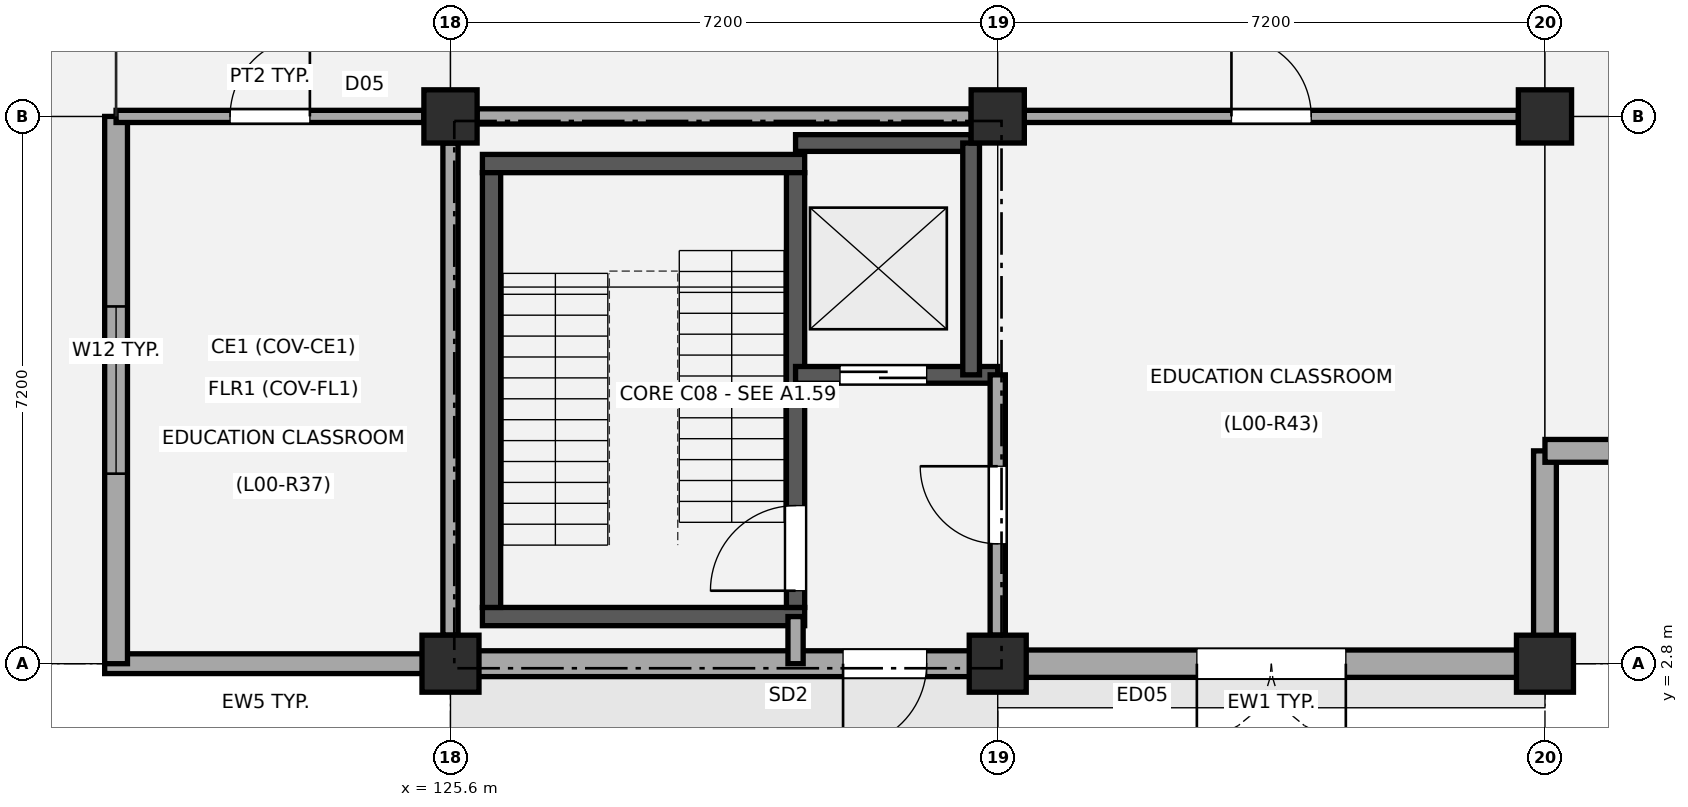
"""IFC4 building model, lengths in metres.
Left out: names, types, materials, properties, quantities, classifications, styles, units other than length and angle.
Written with IfcOpenShell. Run it as: python <this file> out.ifc"""

import sys

from ifc_helpers import new_model, si_unit, direction, frame, frame_2d, origin, origin_2d, place, context, subcontext, project, spatial, rectangle, circle, extrude, element, fill, save


model = new_model("IFC4")
c1 = context("Model", 3, precision=1e-05, world=origin(), true_north=direction((0.0, 1.0)))
c2 = subcontext(c1, "Body", "Model", "MODEL_VIEW")
j1 = project(units=[si_unit("LENGTHUNIT", "METRE"), si_unit("PLANEANGLEUNIT", "RADIAN")], contexts=[c1])
p1 = place(None, origin())
s1 = spatial("IfcSite", under=j1, at=p1, CompositionType="ELEMENT")
p2 = place(p1, origin())
s2 = spatial("IfcBuilding", under=s1, at=p2, CompositionType="ELEMENT")
p3 = place(p2, origin())
s3 = spatial("IfcBuildingStorey", under=s2, at=p3, CompositionType="ELEMENT", Elevation=0.0)
p4 = place(p3, frame((125.6, 2.8, -0.35), z_axis=(0.0, 0.0, 1.0), x_axis=(1.0, 0.0, 0.0)))
e1 = element("IfcColumn", 1, at=p4, inside=s3, PredefinedType="COLUMN", context=c2, shape_type="SweptSolid", body=[
    extrude(circle(Radius=0.375, at=origin_2d()), origin(), (0.0, 0.0, 1.0), 5.03),
])
p5 = place(p3, frame((125.6, 10.0, -0.35), z_axis=(0.0, 0.0, 1.0), x_axis=(1.0, 0.0, 0.0)))
e2 = element("IfcColumn", 2, at=p5, inside=s3, PredefinedType="COLUMN", context=c2, shape_type="SweptSolid", body=[
    extrude(rectangle(XDim=0.7, YDim=0.7, at=origin_2d()), origin(), (0.0, 0.0, 1.0), 5.03),
])
p6 = place(p3, frame((132.8, 2.8, -0.35), z_axis=(0.0, 0.0, 1.0), x_axis=(1.0, 0.0, 0.0)))
e3 = element("IfcColumn", 3, at=p6, inside=s3, PredefinedType="COLUMN", context=c2, shape_type="SweptSolid", body=[
    extrude(circle(Radius=0.375, at=origin_2d()), origin(), (0.0, 0.0, 1.0), 5.03),
])
p7 = place(p3, frame((132.8, 10.0, -0.35), z_axis=(0.0, 0.0, 1.0), x_axis=(1.0, 0.0, 0.0)))
e4 = element("IfcColumn", 4, at=p7, inside=s3, PredefinedType="COLUMN", context=c2, shape_type="SweptSolid", body=[
    extrude(rectangle(XDim=0.7, YDim=0.7, at=origin_2d()), origin(), (0.0, 0.0, 1.0), 5.03),
])
p8 = place(p3, frame((140.0, 2.8, -0.35), z_axis=(0.0, 0.0, 1.0), x_axis=(1.0, 0.0, 0.0)))
e5 = element("IfcColumn", 5, at=p8, inside=s3, PredefinedType="COLUMN", context=c2, shape_type="SweptSolid", body=[
    extrude(circle(Radius=0.375, at=origin_2d()), origin(), (0.0, 0.0, 1.0), 5.03),
])
p9 = place(p3, frame((140.0, 10.0, -0.35), z_axis=(0.0, 0.0, 1.0), x_axis=(1.0, 0.0, 0.0)))
e6 = element("IfcColumn", 6, at=p9, inside=s3, PredefinedType="COLUMN", context=c2, shape_type="SweptSolid", body=[
    extrude(rectangle(XDim=0.7, YDim=0.7, at=origin_2d()), origin(), (0.0, 0.0, 1.0), 5.03),
])
p10 = place(p3, frame((125.29, 2.8, 0.0), z_axis=(0.0, 0.0, 1.0), x_axis=(-1.0, 0.0, 0.0)))
e7 = element("IfcWall", 7, at=p10, inside=s3, PredefinedType="STANDARD", context=c2, shape_type="SweptSolid", body=[
    extrude(rectangle(XDim=4.24, YDim=0.26, at=frame_2d((2.12, 0.0))), origin(), (0.0, 0.0, 1.0), 3.67),
])
p11 = place(p3, frame((132.49, 2.8, 0.0), z_axis=(0.0, 0.0, 1.0), x_axis=(-1.0, 0.0, 0.0)))
e8 = element("IfcWall", 8, at=p11, inside=s3, PredefinedType="STANDARD", context=c2, shape_type="SweptSolid", body=[
    extrude(rectangle(XDim=6.58, YDim=0.34, at=frame_2d((3.29, 0.0))), origin(), (0.0, 0.0, 1.0), 3.67),
])
p12 = place(p11, frame((0.625, 0.0, 0.0)))
e9 = element("IfcOpeningElement", 9, at=p12, cuts=e8, PredefinedType="OPENING", context=c2, shape_type="SweptSolid", body=[
    extrude(rectangle(XDim=1.1, YDim=2.15, at=frame_2d((0.55, 1.075))), frame((0.0, 0.18, 0.0), z_axis=(0.0, -1.0, 0.0), x_axis=(1.0, 0.0, 0.0)), (0.0, 0.0, 1.0), 0.36),
])
p13 = place(p3, frame((139.69, 2.8, 0.0), z_axis=(0.0, 0.0, 1.0), x_axis=(-1.0, 0.0, 0.0)))
e10 = element("IfcWall", 10, at=p13, inside=s3, PredefinedType="STANDARD", context=c2, shape_type="SweptSolid", body=[
    extrude(rectangle(XDim=6.58, YDim=0.36, at=frame_2d((3.29, 0.0))), origin(), (0.0, 0.0, 1.0), 3.67),
])
p14 = place(p13, frame((2.31, 0.0, 0.0)))
e11 = element("IfcOpeningElement", 11, at=p14, cuts=e10, PredefinedType="OPENING", context=c2, shape_type="SweptSolid", body=[
    extrude(rectangle(XDim=1.96, YDim=2.28, at=frame_2d((0.98, 1.14))), frame((0.0, 0.19, 0.0), z_axis=(0.0, -1.0, 0.0), x_axis=(1.0, 0.0, 0.0)), (0.0, 0.0, 1.0), 0.38),
])
p15 = place(p3, frame((121.2, 10.0, 0.0), z_axis=(0.0, 0.0, 1.0), x_axis=(0.0, -1.0, 0.0)))
e12 = element("IfcWall", 12, at=p15, inside=s3, PredefinedType="STANDARD", context=c2, shape_type="SweptSolid", body=[
    extrude(rectangle(XDim=7.2, YDim=0.3, at=frame_2d((3.6, 0.0))), origin(), (0.0, 0.0, 1.0), 4.37),
])
p16 = place(p15, frame((2.5, 0.0, 0.95)))
e13 = element("IfcOpeningElement", 13, at=p16, cuts=e12, PredefinedType="OPENING", context=c2, shape_type="SweptSolid", body=[
    extrude(rectangle(XDim=2.2, YDim=2.0, at=frame_2d((1.1, 1.0))), frame((0.0, 0.16, 0.0), z_axis=(0.0, -1.0, 0.0), x_axis=(1.0, 0.0, 0.0)), (0.0, 0.0, 1.0), 0.32),
])
p17 = place(p3, frame((140.0, 5.6, 0.0), z_axis=(0.0, 0.0, 1.0), x_axis=(0.0, -1.0, 0.0)))
e14 = element("IfcWall", 14, at=p17, inside=s3, PredefinedType="STANDARD", context=c2, shape_type="SweptSolid", body=[
    extrude(rectangle(XDim=2.48, YDim=0.3, at=frame_2d((1.24, 0.0))), origin(), (0.0, 0.0, 1.0), 3.62),
])
p18 = place(p3, frame((147.2, 5.6, 0.0), z_axis=(0.0, 0.0, 1.0), x_axis=(-1.0, 0.0, 0.0)))
e15 = element("IfcWall", 15, at=p18, inside=s3, PredefinedType="STANDARD", context=c2, shape_type="SweptSolid", body=[
    extrude(rectangle(XDim=7.2, YDim=0.3, at=frame_2d((3.6, 0.0))), origin(), (0.0, 0.0, 1.0), 4.37),
])
p19 = place(p18, frame((2.6, 0.0, 0.0)))
e16 = element("IfcOpeningElement", 16, at=p19, cuts=e15, PredefinedType="OPENING", context=c2, shape_type="SweptSolid", body=[
    extrude(rectangle(XDim=2.0, YDim=2.3, at=frame_2d((1.0, 1.15))), frame((0.0, 0.16, 0.0), z_axis=(0.0, -1.0, 0.0), x_axis=(1.0, 0.0, 0.0)), (0.0, 0.0, 1.0), 0.32),
])
for number, where, z_axis, x_axis in (
    (17, (126.02, 3.42, 0.0), (0.0, 0.0, 1.0), (1.0, 0.0, 0.0)),
    (18, (126.02, 9.38, 0.0), (0.0, 0.0, 1.0), (1.0, 0.0, 0.0)),
):
    element("IfcWall", number, at=place(p3, frame(where, z_axis=z_axis, x_axis=x_axis)), inside=s3, PredefinedType="SHEAR", context=c2, shape_type="SweptSolid", body=[
        extrude(rectangle(XDim=4.24, YDim=0.24, at=frame_2d((2.12, 0.0))), origin(), (0.0, 0.0, 1.0), 4.38),
    ])
p20 = place(p3, frame((126.14, 3.54, 0.0), z_axis=(0.0, 0.0, 1.0), x_axis=(0.0, 1.0, 0.0)))
e19 = element("IfcWall", 19, at=p20, inside=s3, PredefinedType="SHEAR", context=c2, shape_type="SweptSolid", body=[
    extrude(rectangle(XDim=5.72, YDim=0.24, at=frame_2d((2.86, 0.0))), origin(), (0.0, 0.0, 1.0), 4.38),
])
p21 = place(p3, frame((130.14, 3.54, 0.0), z_axis=(0.0, 0.0, 1.0), x_axis=(0.0, 1.0, 0.0)))
e20 = element("IfcWall", 20, at=p21, inside=s3, PredefinedType="SHEAR", context=c2, shape_type="SweptSolid", body=[
    extrude(rectangle(XDim=5.72, YDim=0.24, at=frame_2d((2.86, 0.0))), origin(), (0.0, 0.0, 1.0), 4.38),
])
p22 = place(p21, frame((0.22, 0.0, 0.0)))
e21 = element("IfcOpeningElement", 21, at=p22, cuts=e20, PredefinedType="OPENING", context=c2, shape_type="SweptSolid", body=[
    extrude(rectangle(XDim=1.12, YDim=2.15, at=frame_2d((0.56, 1.075))), frame((0.0, 0.13, 0.0), z_axis=(0.0, -1.0, 0.0), x_axis=(1.0, 0.0, 0.0)), (0.0, 0.0, 1.0), 0.26),
])
p23 = place(p3, frame((130.14, 6.6, 0.0), z_axis=(0.0, 0.0, 1.0), x_axis=(1.0, 0.0, 0.0)))
e22 = element("IfcWall", 22, at=p23, inside=s3, PredefinedType="SHEAR", context=c2, shape_type="SweptSolid", body=[
    extrude(rectangle(XDim=2.66, YDim=0.22, at=frame_2d((1.33, 0.0))), origin(), (0.0, 0.0, 1.0), 4.38),
])
p24 = place(p23, frame((0.585, 0.0, 0.0)))
e23 = element("IfcOpeningElement", 23, at=p24, cuts=e22, PredefinedType="OPENING", context=c2, shape_type="SweptSolid", body=[
    extrude(rectangle(XDim=1.14, YDim=2.15, at=frame_2d((0.57, 1.075))), frame((0.0, 0.12, 0.0), z_axis=(0.0, -1.0, 0.0), x_axis=(1.0, 0.0, 0.0)), (0.0, 0.0, 1.0), 0.24),
])
p25 = place(p3, frame((130.14, 9.65, 0.0), z_axis=(0.0, 0.0, 1.0), x_axis=(1.0, 0.0, 0.0)))
e24 = element("IfcWall", 24, at=p25, inside=s3, PredefinedType="SHEAR", context=c2, shape_type="SweptSolid", body=[
    extrude(rectangle(XDim=2.31, YDim=0.22, at=frame_2d((1.155, 0.0))), origin(), (0.0, 0.0, 1.0), 4.38),
])
p26 = place(p3, frame((132.45, 6.6, 0.0), z_axis=(0.0, 0.0, 1.0), x_axis=(0.0, 1.0, 0.0)))
e25 = element("IfcWall", 25, at=p26, inside=s3, PredefinedType="SHEAR", context=c2, shape_type="SweptSolid", body=[
    extrude(rectangle(XDim=3.05, YDim=0.22, at=frame_2d((1.525, 0.0))), origin(), (0.0, 0.0, 1.0), 4.38),
])
p27 = place(p3, frame((130.14, 2.8, 0.0), z_axis=(0.0, 0.0, 1.0), x_axis=(0.0, 1.0, 0.0)))
e26 = element("IfcWall", 26, at=p27, inside=s3, PredefinedType="PARTITIONING", context=c2, shape_type="SweptSolid", body=[
    extrude(rectangle(XDim=0.62, YDim=0.2, at=frame_2d((0.31, 0.0))), origin(), (0.0, 0.0, 1.0), 3.67),
])
p28 = place(p3, frame((125.6, 3.175, 0.0), z_axis=(0.0, 0.0, 1.0), x_axis=(0.0, 1.0, 0.0)))
e27 = element("IfcWall", 27, at=p28, inside=s3, PredefinedType="PARTITIONING", context=c2, shape_type="SweptSolid", body=[
    extrude(rectangle(XDim=6.475, YDim=0.2, at=frame_2d((3.237, 0.0))), origin(), (0.0, 0.0, 1.0), 3.62),
])
p29 = place(p3, frame((132.8, 3.175, 0.0), z_axis=(0.0, 0.0, 1.0), x_axis=(0.0, 1.0, 0.0)))
e28 = element("IfcWall", 28, at=p29, inside=s3, PredefinedType="PARTITIONING", context=c2, shape_type="SweptSolid", body=[
    extrude(rectangle(XDim=3.425, YDim=0.2, at=frame_2d((1.712, 0.0))), origin(), (0.0, 0.0, 1.0), 3.62),
])
p30 = place(p29, frame((1.202, 0.0, 0.0)))
e29 = element("IfcOpeningElement", 29, at=p30, cuts=e28, PredefinedType="OPENING", context=c2, shape_type="SweptSolid", body=[
    extrude(rectangle(XDim=1.02, YDim=2.15, at=frame_2d((0.51, 1.075))), frame((0.0, 0.11, 0.0), z_axis=(0.0, -1.0, 0.0), x_axis=(1.0, 0.0, 0.0)), (0.0, 0.0, 1.0), 0.22),
])
p31 = place(p3, frame((125.95, 10.0, 0.0), z_axis=(0.0, 0.0, 1.0), x_axis=(1.0, 0.0, 0.0)))
e30 = element("IfcWall", 30, at=p31, inside=s3, PredefinedType="PARTITIONING", context=c2, shape_type="SweptSolid", body=[
    extrude(rectangle(XDim=6.5, YDim=0.2, at=frame_2d((3.25, 0.0))), origin(), (0.0, 0.0, 1.0), 3.52),
])
p32 = place(p3, frame((121.2, 10.0, 0.0), z_axis=(0.0, 0.0, 1.0), x_axis=(1.0, 0.0, 0.0)))
e31 = element("IfcWall", 31, at=p32, inside=s3, PredefinedType="PARTITIONING", context=c2, shape_type="SweptSolid", body=[
    extrude(rectangle(XDim=4.05, YDim=0.16, at=frame_2d((2.025, 0.0))), origin(), (0.0, 0.0, 1.0), 3.62),
])
p33 = place(p32, frame((1.5, 0.0, 0.0)))
e32 = element("IfcOpeningElement", 32, at=p33, cuts=e31, PredefinedType="OPENING", context=c2, shape_type="SweptSolid", body=[
    extrude(rectangle(XDim=1.05, YDim=2.14, at=frame_2d((0.525, 1.07))), frame((0.0, 0.09, 0.0), z_axis=(0.0, -1.0, 0.0), x_axis=(1.0, 0.0, 0.0)), (0.0, 0.0, 1.0), 0.18),
])
p34 = place(p3, frame((133.15, 10.0, 0.0), z_axis=(0.0, 0.0, 1.0), x_axis=(1.0, 0.0, 0.0)))
e33 = element("IfcWall", 33, at=p34, inside=s3, PredefinedType="PARTITIONING", context=c2, shape_type="SweptSolid", body=[
    extrude(rectangle(XDim=6.5, YDim=0.16, at=frame_2d((3.25, 0.0))), origin(), (0.0, 0.0, 1.0), 3.62),
])
p35 = place(p34, frame((2.725, 0.0, 0.0)))
e34 = element("IfcOpeningElement", 34, at=p35, cuts=e33, PredefinedType="OPENING", context=c2, shape_type="SweptSolid", body=[
    extrude(rectangle(XDim=1.05, YDim=2.14, at=frame_2d((0.525, 1.07))), frame((0.0, 0.09, 0.0), z_axis=(0.0, -1.0, 0.0), x_axis=(1.0, 0.0, 0.0)), (0.0, 0.0, 1.0), 0.18),
])
p36 = place(p12, origin())
e35 = element("IfcDoor", 35, at=p36, inside=s3, OperationType="SINGLE_SWING_RIGHT", PredefinedType="DOOR", context=c2, shape_type="SweptSolid", body=[
    extrude(rectangle(XDim=1.1, YDim=2.15, at=frame_2d((0.55, 1.075))), frame((0.0, 0.025, 0.0), z_axis=(0.0, -1.0, 0.0), x_axis=(1.0, 0.0, 0.0)), (0.0, 0.0, 1.0), 0.05),
])
fill(e9, e35)
p37 = place(p14, origin())
e36 = element("IfcDoor", 36, at=p37, inside=s3, OperationType="DOUBLE_DOOR_SINGLE_SWING", PredefinedType="DOOR", context=c2, shape_type="SweptSolid", body=[
    extrude(rectangle(XDim=1.96, YDim=2.28, at=frame_2d((0.98, 1.14))), frame((0.0, 0.025, 0.0), z_axis=(0.0, -1.0, 0.0), x_axis=(1.0, 0.0, 0.0)), (0.0, 0.0, 1.0), 0.05),
])
fill(e11, e36)
p38 = place(p16, origin())
e37 = element("IfcWindow", 37, at=p38, inside=s3, PartitioningType="SINGLE_PANEL", PredefinedType="WINDOW", context=c2, shape_type="SweptSolid", body=[
    extrude(rectangle(XDim=2.2, YDim=2.0, at=frame_2d((1.1, 1.0))), frame((0.0, 0.03, 0.0), z_axis=(0.0, -1.0, 0.0), x_axis=(1.0, 0.0, 0.0)), (0.0, 0.0, 1.0), 0.06),
])
fill(e13, e37)
p39 = place(p22, origin())
e38 = element("IfcDoor", 38, at=p39, inside=s3, OperationType="SINGLE_SWING_LEFT", PredefinedType="DOOR", context=c2, shape_type="SweptSolid", body=[
    extrude(rectangle(XDim=1.12, YDim=2.15, at=frame_2d((0.56, 1.075))), frame((0.0, 0.025, 0.0), z_axis=(0.0, -1.0, 0.0), x_axis=(1.0, 0.0, 0.0)), (0.0, 0.0, 1.0), 0.05),
])
fill(e21, e38)
p40 = place(p24, origin())
e39 = element("IfcDoor", 39, at=p40, inside=s3, OperationType="SLIDING_TO_LEFT", PredefinedType="DOOR", context=c2, shape_type="SweptSolid", body=[
    extrude(rectangle(XDim=1.14, YDim=2.15, at=frame_2d((0.57, 1.075))), frame((0.0, 0.025, 0.0), z_axis=(0.0, -1.0, 0.0), x_axis=(1.0, 0.0, 0.0)), (0.0, 0.0, 1.0), 0.05),
])
fill(e23, e39)
p41 = place(p30, origin())
e40 = element("IfcDoor", 40, at=p41, inside=s3, OperationType="SINGLE_SWING_RIGHT", PredefinedType="DOOR", context=c2, shape_type="SweptSolid", body=[
    extrude(rectangle(XDim=1.02, YDim=2.15, at=frame_2d((0.51, 1.075))), frame((0.0, 0.025, 0.0), z_axis=(0.0, -1.0, 0.0), x_axis=(1.0, 0.0, 0.0)), (0.0, 0.0, 1.0), 0.05),
])
fill(e29, e40)
p42 = place(p33, origin())
e41 = element("IfcDoor", 41, at=p42, inside=s3, OperationType="SINGLE_SWING_RIGHT", PredefinedType="DOOR", context=c2, shape_type="SweptSolid", body=[
    extrude(rectangle(XDim=1.05, YDim=2.14, at=frame_2d((0.525, 1.07))), frame((0.0, 0.025, 0.0), z_axis=(0.0, -1.0, 0.0), x_axis=(1.0, 0.0, 0.0)), (0.0, 0.0, 1.0), 0.05),
])
fill(e32, e41)
p43 = place(p35, origin())
e42 = element("IfcDoor", 42, at=p43, inside=s3, OperationType="SINGLE_SWING_LEFT", PredefinedType="DOOR", context=c2, shape_type="SweptSolid", body=[
    extrude(rectangle(XDim=1.05, YDim=2.14, at=frame_2d((0.525, 1.07))), frame((0.0, 0.025, 0.0), z_axis=(0.0, -1.0, 0.0), x_axis=(1.0, 0.0, 0.0)), (0.0, 0.0, 1.0), 0.05),
])
fill(e34, e42)
save(model, sys.argv[1])
